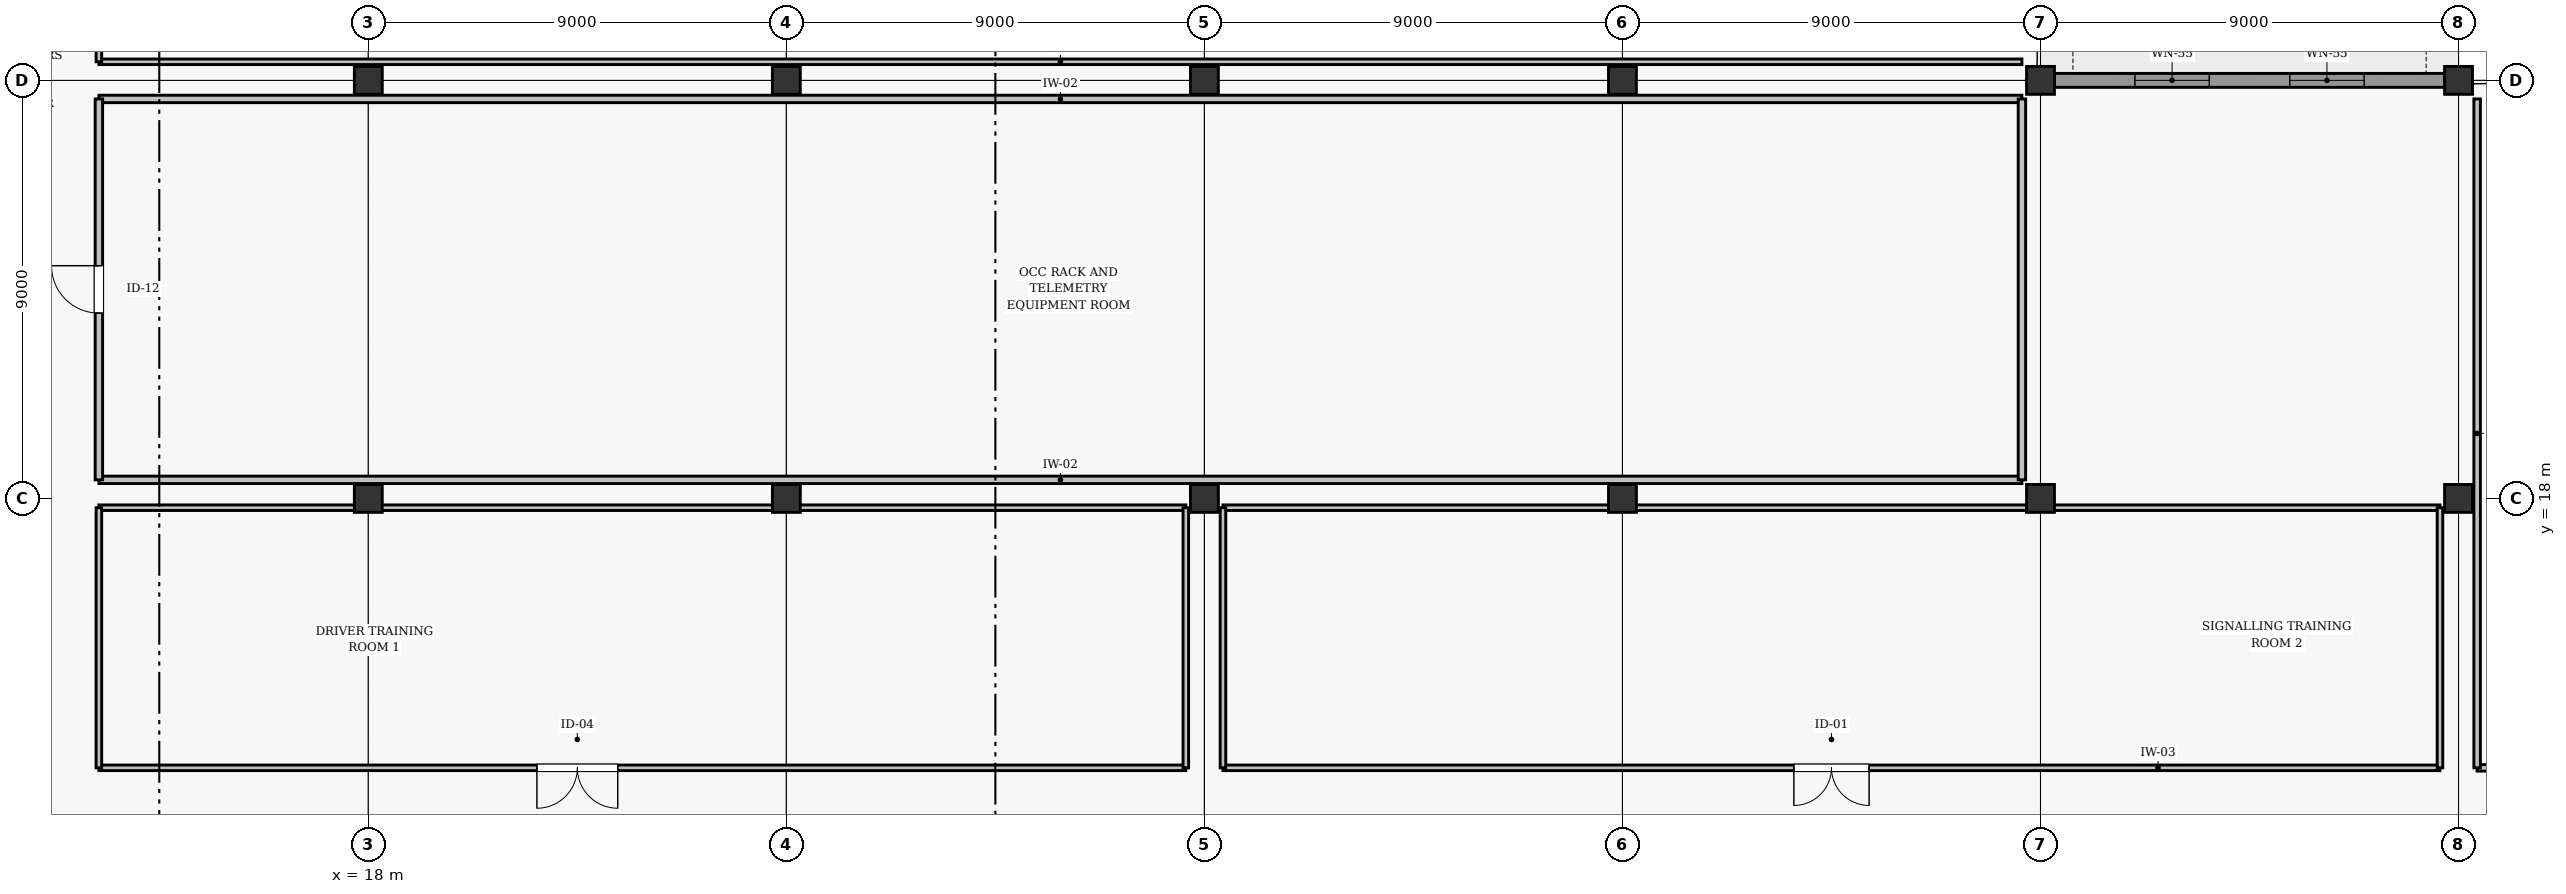
"""IFC4 building model, lengths in metres.
Left out: names, types, materials, properties, quantities, classifications, styles, units other than length and angle.
Written with IfcOpenShell. Run it as: python <this file> out.ifc"""

import sys

from ifc_helpers import new_model, si_unit, direction, frame, frame_2d, origin, origin_2d, place, context, subcontext, project, spatial, rectangle, extrude, element, fill, save


model = new_model("IFC4")
c1 = context("Model", 3, precision=1e-05, world=origin(), true_north=direction((0.0, 1.0)))
c2 = subcontext(c1, "Body", "Model", "MODEL_VIEW")
j1 = project(units=[si_unit("LENGTHUNIT", "METRE"), si_unit("PLANEANGLEUNIT", "RADIAN")], contexts=[c1])
p1 = place(None, origin())
s1 = spatial("IfcSite", under=j1, at=p1, CompositionType="ELEMENT")
p2 = place(p1, origin())
s2 = spatial("IfcBuilding", under=s1, at=p2, CompositionType="ELEMENT")
p3 = place(p2, frame((0.0, 0.0, 8.4)))
s3 = spatial("IfcBuildingStorey", under=s2, at=p3, CompositionType="ELEMENT", Elevation=8.4)
for number, where, z_axis, x_axis in (
    (1, (18.0, 18.0, 0.0), (0.0, 0.0, 1.0), (1.0, 0.0, 0.0)),
    (2, (18.0, 27.0, 0.0), (0.0, 0.0, 1.0), (1.0, 0.0, 0.0)),
    (3, (27.0, 18.0, 0.0), (0.0, 0.0, 1.0), (1.0, 0.0, 0.0)),
    (4, (27.0, 27.0, 0.0), (0.0, 0.0, 1.0), (1.0, 0.0, 0.0)),
    (5, (36.0, 18.0, 0.0), (0.0, 0.0, 1.0), (1.0, 0.0, 0.0)),
    (6, (36.0, 27.0, 0.0), (0.0, 0.0, 1.0), (1.0, 0.0, 0.0)),
    (7, (45.0, 18.0, 0.0), (0.0, 0.0, 1.0), (1.0, 0.0, 0.0)),
    (8, (45.0, 27.0, 0.0), (0.0, 0.0, 1.0), (1.0, 0.0, 0.0)),
    (9, (54.0, 18.0, 0.0), (0.0, 0.0, 1.0), (1.0, 0.0, 0.0)),
    (10, (54.0, 27.0, 0.0), (0.0, 0.0, 1.0), (1.0, 0.0, 0.0)),
    (11, (63.0, 18.0, 0.0), (0.0, 0.0, 1.0), (1.0, 0.0, 0.0)),
    (12, (63.0, 27.0, 0.0), (0.0, 0.0, 1.0), (1.0, 0.0, 0.0)),
):
    element("IfcColumn", number, at=place(p3, frame(where, z_axis=z_axis, x_axis=x_axis)), inside=s3, PredefinedType="COLUMN", context=c2, shape_type="SweptSolid", body=[
        extrude(rectangle(XDim=0.6, YDim=0.6, at=origin_2d()), origin(), (0.0, 0.0, 1.0), 3.6),
    ])
p4 = place(p3, frame((54.298, 27.0, 0.0), z_axis=(0.0, 0.0, 1.0), x_axis=(1.0, 0.0, 0.0)))
e13 = element("IfcWall", 13, at=p4, inside=s3, PredefinedType="SOLIDWALL", context=c2, shape_type="SweptSolid", body=[
    extrude(rectangle(XDim=8.404, YDim=0.3, at=frame_2d((4.202, 0.0))), origin(), (0.0, 0.0, 1.0), 2.902),
])
p5 = place(p4, frame((1.735, 0.0, 0.85)))
e14 = element("IfcOpeningElement", 14, at=p5, cuts=e13, PredefinedType="OPENING", context=c2, shape_type="SweptSolid", body=[
    extrude(rectangle(XDim=1.6, YDim=1.86, at=frame_2d((0.8, 0.93))), frame((0.0, 0.16, 0.0), z_axis=(0.0, -1.0, 0.0), x_axis=(1.0, 0.0, 0.0)), (0.0, 0.0, 1.0), 0.32),
])
p6 = place(p4, frame((5.069, 0.0, 0.85)))
e15 = element("IfcOpeningElement", 15, at=p6, cuts=e13, PredefinedType="OPENING", context=c2, shape_type="SweptSolid", body=[
    extrude(rectangle(XDim=1.6, YDim=1.86, at=frame_2d((0.8, 0.93))), frame((0.0, 0.16, 0.0), z_axis=(0.0, -1.0, 0.0), x_axis=(1.0, 0.0, 0.0)), (0.0, 0.0, 1.0), 0.32),
])
p7 = place(p3, frame((12.2, 12.2, 0.0), z_axis=(0.0, 0.0, 1.0), x_axis=(1.0, 0.0, 0.0)))
e16 = element("IfcWall", 16, at=p7, inside=s3, PredefinedType="PARTITIONING", context=c2, shape_type="SweptSolid", body=[
    extrude(rectangle(XDim=23.4, YDim=0.12, at=frame_2d((11.7, 0.0))), origin(), (0.0, 0.0, 1.0), 2.895),
])
p8 = place(p7, frame((9.43, 0.0, 0.0)))
e17 = element("IfcOpeningElement", 17, at=p8, cuts=e16, PredefinedType="OPENING", context=c2, shape_type="SweptSolid", body=[
    extrude(rectangle(XDim=1.74, YDim=2.18, at=frame_2d((0.87, 1.09))), frame((0.0, 0.07, 0.0), z_axis=(0.0, -1.0, 0.0), x_axis=(1.0, 0.0, 0.0)), (0.0, 0.0, 1.0), 0.14),
])
p9 = place(p3, frame((12.2, 17.8, 0.0), z_axis=(0.0, 0.0, 1.0), x_axis=(1.0, 0.0, 0.0)))
e18 = element("IfcWall", 18, at=p9, inside=s3, PredefinedType="PARTITIONING", context=c2, shape_type="SweptSolid", body=[
    extrude(rectangle(XDim=23.4, YDim=0.12, at=frame_2d((11.7, 0.0))), origin(), (0.0, 0.0, 1.0), 2.845),
])
for number, where, z_axis, x_axis in (
    (19, (12.2, 12.2, 0.0), (0.0, 0.0, 1.0), (0.0, 1.0, 0.0)),
    (20, (35.6, 12.2, 0.0), (0.0, 0.0, 1.0), (0.0, 1.0, 0.0)),
):
    element("IfcWall", number, at=place(p3, frame(where, z_axis=z_axis, x_axis=x_axis)), inside=s3, PredefinedType="PARTITIONING", context=c2, shape_type="SweptSolid", body=[
        extrude(rectangle(XDim=5.6, YDim=0.12, at=frame_2d((2.8, 0.0))), origin(), (0.0, 0.0, 1.0), 2.845),
    ])
p10 = place(p3, frame((36.4, 12.2, 0.0), z_axis=(0.0, 0.0, 1.0), x_axis=(1.0, 0.0, 0.0)))
e21 = element("IfcWall", 21, at=p10, inside=s3, PredefinedType="PARTITIONING", context=c2, shape_type="SweptSolid", body=[
    extrude(rectangle(XDim=26.2, YDim=0.12, at=frame_2d((13.1, 0.0))), origin(), (0.0, 0.0, 1.0), 2.895),
])
p11 = place(p10, frame((12.29, 0.0, 0.0)))
e22 = element("IfcOpeningElement", 22, at=p11, cuts=e21, PredefinedType="OPENING", context=c2, shape_type="SweptSolid", body=[
    extrude(rectangle(XDim=1.62, YDim=2.14, at=frame_2d((0.81, 1.07))), frame((0.0, 0.07, 0.0), z_axis=(0.0, -1.0, 0.0), x_axis=(1.0, 0.0, 0.0)), (0.0, 0.0, 1.0), 0.14),
])
p12 = place(p3, frame((36.4, 17.8, 0.0), z_axis=(0.0, 0.0, 1.0), x_axis=(1.0, 0.0, 0.0)))
e23 = element("IfcWall", 23, at=p12, inside=s3, PredefinedType="PARTITIONING", context=c2, shape_type="SweptSolid", body=[
    extrude(rectangle(XDim=26.2, YDim=0.12, at=frame_2d((13.1, 0.0))), origin(), (0.0, 0.0, 1.0), 2.845),
])
p13 = place(p3, frame((36.4, 12.2, 0.0), z_axis=(0.0, 0.0, 1.0), x_axis=(0.0, 1.0, 0.0)))
e24 = element("IfcWall", 24, at=p13, inside=s3, PredefinedType="PARTITIONING", context=c2, shape_type="SweptSolid", body=[
    extrude(rectangle(XDim=5.6, YDim=0.12, at=frame_2d((2.8, 0.0))), origin(), (0.0, 0.0, 1.0), 2.845),
])
p14 = place(p3, frame((62.6, 12.2, 0.0), z_axis=(0.0, 0.0, 1.0), x_axis=(0.0, 1.0, 0.0)))
e25 = element("IfcWall", 25, at=p14, inside=s3, PredefinedType="PARTITIONING", context=c2, shape_type="SweptSolid", body=[
    extrude(rectangle(XDim=5.6, YDim=0.12, at=frame_2d((2.8, 0.0))), origin(), (0.0, 0.0, 1.0), 2.865),
])
p15 = place(p3, frame((63.4, 12.2, 0.0), z_axis=(0.0, 0.0, 1.0), x_axis=(1.0, 0.0, 0.0)))
e26 = element("IfcWall", 26, at=p15, inside=s3, PredefinedType="PARTITIONING", context=c2, shape_type="SweptSolid", body=[
    extrude(rectangle(XDim=7.2, YDim=0.14, at=frame_2d((3.6, 0.0))), origin(), (0.0, 0.0, 1.0), 3.095),
])
p16 = place(p15, frame((3.145, 0.0, 0.0)))
e27 = element("IfcOpeningElement", 27, at=p16, cuts=e26, PredefinedType="OPENING", context=c2, shape_type="SweptSolid", body=[
    extrude(rectangle(XDim=0.91, YDim=2.04, at=frame_2d((0.455, 1.02))), frame((0.0, 0.08, 0.0), z_axis=(0.0, -1.0, 0.0), x_axis=(1.0, 0.0, 0.0)), (0.0, 0.0, 1.0), 0.16),
])
p17 = place(p3, frame((63.4, 12.2, 0.0), z_axis=(0.0, 0.0, 1.0), x_axis=(0.0, 1.0, 0.0)))
e28 = element("IfcWall", 28, at=p17, inside=s3, PredefinedType="PARTITIONING", context=c2, shape_type="SweptSolid", body=[
    extrude(rectangle(XDim=14.4, YDim=0.14, at=frame_2d((7.2, 0.0))), origin(), (0.0, 0.0, 1.0), 2.865),
])
for number, where, z_axis, x_axis in (
    (29, (12.2, 18.4, 0.0), (0.0, 0.0, 1.0), (1.0, 0.0, 0.0)),
    (30, (12.2, 26.6, 0.0), (0.0, 0.0, 1.0), (1.0, 0.0, 0.0)),
):
    element("IfcWall", number, at=place(p3, frame(where, z_axis=z_axis, x_axis=x_axis)), inside=s3, PredefinedType="PARTITIONING", context=c2, shape_type="SweptSolid", body=[
        extrude(rectangle(XDim=41.4, YDim=0.16, at=frame_2d((20.7, 0.0))), origin(), (0.0, 0.0, 1.0), 2.895),
    ])
p18 = place(p3, frame((12.2, 18.4, 0.0), z_axis=(0.0, 0.0, 1.0), x_axis=(0.0, 1.0, 0.0)))
e31 = element("IfcWall", 31, at=p18, inside=s3, PredefinedType="PARTITIONING", context=c2, shape_type="SweptSolid", body=[
    extrude(rectangle(XDim=8.2, YDim=0.16, at=frame_2d((4.1, 0.0))), origin(), (0.0, 0.0, 1.0), 3.35),
])
p19 = place(p18, frame((3.59, 0.0, 0.0)))
e32 = element("IfcOpeningElement", 32, at=p19, cuts=e31, PredefinedType="OPENING", context=c2, shape_type="SweptSolid", body=[
    extrude(rectangle(XDim=1.02, YDim=2.1, at=frame_2d((0.51, 1.05))), frame((0.0, 0.09, 0.0), z_axis=(0.0, -1.0, 0.0), x_axis=(1.0, 0.0, 0.0)), (0.0, 0.0, 1.0), 0.18),
])
p20 = place(p3, frame((53.6, 18.4, 0.0), z_axis=(0.0, 0.0, 1.0), x_axis=(0.0, 1.0, 0.0)))
e33 = element("IfcWall", 33, at=p20, inside=s3, PredefinedType="PARTITIONING", context=c2, shape_type="SweptSolid", body=[
    extrude(rectangle(XDim=8.2, YDim=0.16, at=frame_2d((4.1, 0.0))), origin(), (0.0, 0.0, 1.0), 3.35),
])
p21 = place(p3, frame((12.2, 27.4, 0.0), z_axis=(0.0, 0.0, 1.0), x_axis=(1.0, 0.0, 0.0)))
e34 = element("IfcWall", 34, at=p21, inside=s3, PredefinedType="PARTITIONING", context=c2, shape_type="SweptSolid", body=[
    extrude(rectangle(XDim=41.4, YDim=0.12, at=frame_2d((20.7, 0.0))), origin(), (0.0, 0.0, 1.0), 2.845),
])
p22 = place(p3, frame((12.2, 27.4, 0.0), z_axis=(0.0, 0.0, 1.0), x_axis=(0.0, 1.0, 0.0)))
e35 = element("IfcWall", 35, at=p22, inside=s3, PredefinedType="PARTITIONING", context=c2, shape_type="SweptSolid", body=[
    extrude(rectangle(XDim=8.2, YDim=0.12, at=frame_2d((4.1, 0.0))), origin(), (0.0, 0.0, 1.0), 3.35),
])
p23 = place(p22, frame((3.61, 0.0, 0.0)))
e36 = element("IfcOpeningElement", 36, at=p23, cuts=e35, PredefinedType="OPENING", context=c2, shape_type="SweptSolid", body=[
    extrude(rectangle(XDim=0.98, YDim=2.08, at=frame_2d((0.49, 1.04))), frame((0.0, 0.07, 0.0), z_axis=(0.0, -1.0, 0.0), x_axis=(1.0, 0.0, 0.0)), (0.0, 0.0, 1.0), 0.14),
])
p24 = place(p5, origin())
e37 = element("IfcWindow", 37, at=p24, inside=s3, PartitioningType="SINGLE_PANEL", PredefinedType="WINDOW", context=c2, shape_type="SweptSolid", body=[
    extrude(rectangle(XDim=1.6, YDim=1.86, at=frame_2d((0.8, 0.93))), frame((0.0, 0.03, 0.0), z_axis=(0.0, -1.0, 0.0), x_axis=(1.0, 0.0, 0.0)), (0.0, 0.0, 1.0), 0.06),
])
fill(e14, e37)
p25 = place(p6, origin())
e38 = element("IfcWindow", 38, at=p25, inside=s3, PartitioningType="SINGLE_PANEL", PredefinedType="WINDOW", context=c2, shape_type="SweptSolid", body=[
    extrude(rectangle(XDim=1.6, YDim=1.86, at=frame_2d((0.8, 0.93))), frame((0.0, 0.03, 0.0), z_axis=(0.0, -1.0, 0.0), x_axis=(1.0, 0.0, 0.0)), (0.0, 0.0, 1.0), 0.06),
])
fill(e15, e38)
p26 = place(p8, frame((1.74, 0.0, 0.0), z_axis=(0.0, 0.0, 1.0), x_axis=(-1.0, 0.0, 0.0)))
e39 = element("IfcDoor", 39, at=p26, inside=s3, OperationType="DOUBLE_SWING_LEFT", PredefinedType="DOOR", context=c2, shape_type="SweptSolid", body=[
    extrude(rectangle(XDim=1.74, YDim=2.18, at=frame_2d((0.87, 1.09))), frame((0.0, 0.025, 0.0), z_axis=(0.0, -1.0, 0.0), x_axis=(1.0, 0.0, 0.0)), (0.0, 0.0, 1.0), 0.05),
])
fill(e17, e39)
p27 = place(p11, frame((1.62, 0.0, 0.0), z_axis=(0.0, 0.0, 1.0), x_axis=(-1.0, 0.0, 0.0)))
e40 = element("IfcDoor", 40, at=p27, inside=s3, OperationType="DOUBLE_SWING_LEFT", PredefinedType="DOOR", context=c2, shape_type="SweptSolid", body=[
    extrude(rectangle(XDim=1.62, YDim=2.14, at=frame_2d((0.81, 1.07))), frame((0.0, 0.025, 0.0), z_axis=(0.0, -1.0, 0.0), x_axis=(1.0, 0.0, 0.0)), (0.0, 0.0, 1.0), 0.05),
])
fill(e22, e40)
p28 = place(p19, origin())
e41 = element("IfcDoor", 41, at=p28, inside=s3, OperationType="SINGLE_SWING_RIGHT", PredefinedType="DOOR", context=c2, shape_type="SweptSolid", body=[
    extrude(rectangle(XDim=1.02, YDim=2.1, at=frame_2d((0.51, 1.05))), frame((0.0, 0.025, 0.0), z_axis=(0.0, -1.0, 0.0), x_axis=(1.0, 0.0, 0.0)), (0.0, 0.0, 1.0), 0.05),
])
fill(e32, e41)
save(model, sys.argv[1])
